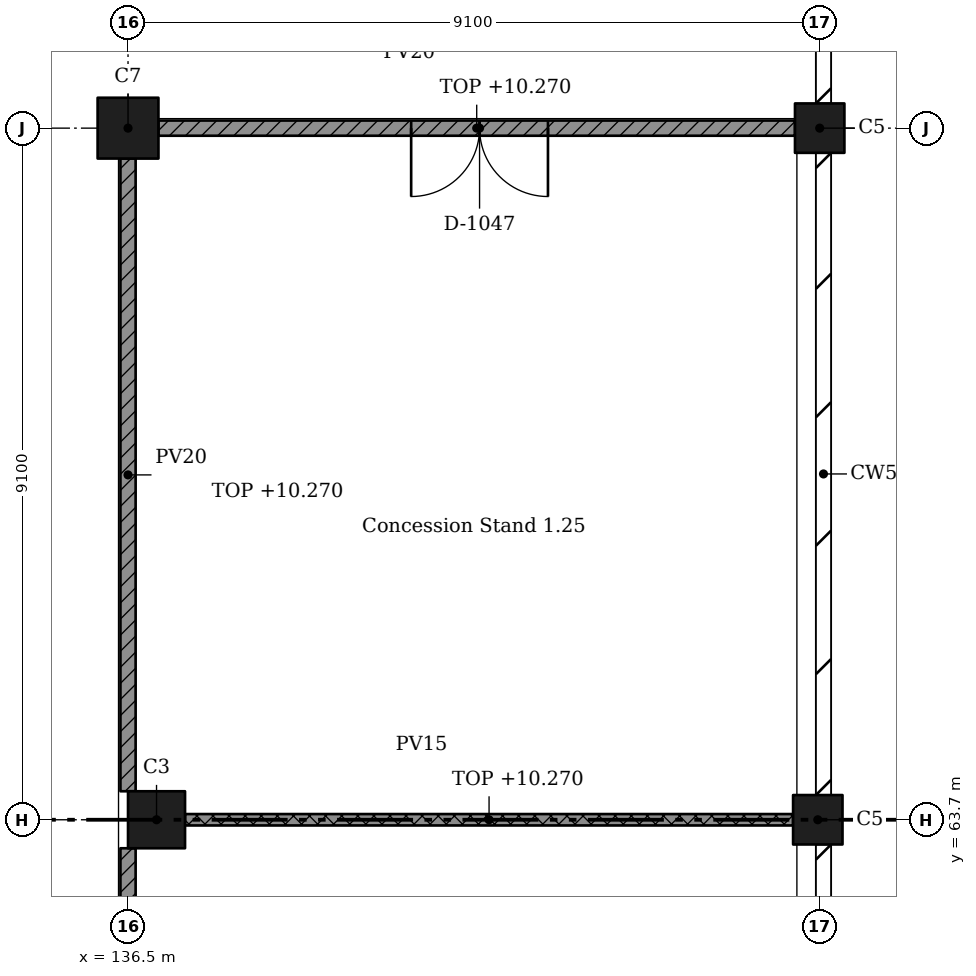
"""IFC4 building model, lengths in metres.
Left out: names, types, materials, properties, quantities, classifications, styles, units other than length and angle.
Written with IfcOpenShell. Run it as: python <this file> out.ifc"""

import sys

from ifc_helpers import new_model, si_unit, direction, frame, frame_2d, origin, origin_2d, place, context, subcontext, project, spatial, rectangle, extrude, element, fill, save


model = new_model("IFC4")
c1 = context("Model", 3, precision=1e-05, world=origin(), true_north=direction((0.0, 1.0)))
c2 = subcontext(c1, "Body", "Model", "MODEL_VIEW")
j1 = project(units=[si_unit("LENGTHUNIT", "METRE"), si_unit("PLANEANGLEUNIT", "RADIAN")], contexts=[c1])
p1 = place(None, origin())
s1 = spatial("IfcSite", under=j1, at=p1, CompositionType="ELEMENT")
p2 = place(p1, origin())
s2 = spatial("IfcBuilding", under=s1, at=p2, CompositionType="ELEMENT")
p3 = place(p2, frame((0.0, 0.0, 6.37)))
s3 = spatial("IfcBuildingStorey", under=s2, at=p3, CompositionType="ELEMENT", Elevation=6.37)
p4 = place(p3, frame((136.875, 63.7, 0.0), z_axis=(0.0, 0.0, 1.0), x_axis=(1.0, 0.0, 0.0)))
e1 = element("IfcColumn", 1, at=p4, inside=s3, PredefinedType="COLUMN", context=c2, shape_type="SweptSolid", body=[
    extrude(rectangle(XDim=0.75, YDim=0.75, at=origin_2d()), origin(), (0.0, 0.0, 1.0), 4.55),
])
p5 = place(p3, frame((136.5, 72.8, 0.0), z_axis=(0.0, 0.0, 1.0), x_axis=(1.0, 0.0, 0.0)))
e2 = element("IfcColumn", 2, at=p5, inside=s3, PredefinedType="COLUMN", context=c2, shape_type="SweptSolid", body=[
    extrude(rectangle(XDim=0.8, YDim=0.8, at=origin_2d()), origin(), (0.0, 0.0, 1.0), 4.55),
])
for number, where, z_axis, x_axis in (
    (3, (145.575, 63.7, 0.0), (0.0, 0.0, 1.0), (1.0, 0.0, 0.0)),
    (4, (145.6, 72.8, 0.0), (0.0, 0.0, 1.0), (1.0, 0.0, 0.0)),
):
    element("IfcColumn", number, at=place(p3, frame(where, z_axis=z_axis, x_axis=x_axis)), inside=s3, PredefinedType="COLUMN", context=c2, shape_type="SweptSolid", body=[
        extrude(rectangle(XDim=0.65, YDim=0.65, at=origin_2d()), origin(), (0.0, 0.0, 1.0), 4.55),
    ])
p6 = place(p3, frame((136.5, 63.325, 0.0), z_axis=(0.0, 0.0, 1.0), x_axis=(0.0, -1.0, 0.0)))
e5 = element("IfcWall", 5, at=p6, inside=s3, PredefinedType="PARTITIONING", context=c2, shape_type="SweptSolid", body=[
    extrude(rectangle(XDim=8.35, YDim=0.2, at=frame_2d((4.175, 0.0))), origin(), (0.0, 0.0, 1.0), 3.9),
])
p7 = place(p6, frame((3.65, 0.0, 0.0)))
e6 = element("IfcOpeningElement", 6, at=p7, cuts=e5, PredefinedType="OPENING", context=c2, shape_type="SweptSolid", body=[
    extrude(rectangle(XDim=1.0, YDim=2.1, at=frame_2d((0.5, 1.05))), frame((0.0, 0.11, 0.0), z_axis=(0.0, -1.0, 0.0), x_axis=(1.0, 0.0, 0.0)), (0.0, 0.0, 1.0), 0.22),
])
p8 = place(p3, frame((136.5, 72.4, 0.0), z_axis=(0.0, 0.0, 1.0), x_axis=(0.0, -1.0, 0.0)))
e7 = element("IfcWall", 7, at=p8, inside=s3, PredefinedType="PARTITIONING", context=c2, shape_type="SweptSolid", body=[
    extrude(rectangle(XDim=8.325, YDim=0.2, at=frame_2d((4.163, 0.0))), origin(), (0.0, 0.0, 1.0), 3.9),
])
p9 = place(p3, frame((137.25, 63.7, 0.0), z_axis=(0.0, 0.0, 1.0), x_axis=(1.0, 0.0, 0.0)))
e8 = element("IfcWall", 8, at=p9, inside=s3, PredefinedType="PARTITIONING", context=c2, shape_type="SweptSolid", body=[
    extrude(rectangle(XDim=8.0, YDim=0.15, at=frame_2d((4.0, 0.0))), origin(), (0.0, 0.0, 1.0), 3.9),
])
p10 = place(p3, frame((145.275, 72.8, 0.0), z_axis=(0.0, 0.0, 1.0), x_axis=(-1.0, 0.0, 0.0)))
e9 = element("IfcWall", 9, at=p10, inside=s3, PredefinedType="PARTITIONING", context=c2, shape_type="SweptSolid", body=[
    extrude(rectangle(XDim=8.375, YDim=0.2, at=frame_2d((4.188, 0.0))), origin(), (0.0, 0.0, 1.0), 3.9),
])
p11 = place(p10, frame((3.25, 0.0, 0.0)))
e10 = element("IfcOpeningElement", 10, at=p11, cuts=e9, PredefinedType="OPENING", context=c2, shape_type="SweptSolid", body=[
    extrude(rectangle(XDim=1.8, YDim=2.1, at=frame_2d((0.9, 1.05))), frame((0.0, 0.11, 0.0), z_axis=(0.0, -1.0, 0.0), x_axis=(1.0, 0.0, 0.0)), (0.0, 0.0, 1.0), 0.22),
])
p12 = place(p11, origin())
e11 = element("IfcDoor", 11, at=p12, inside=s3, OperationType="DOUBLE_DOOR_SINGLE_SWING", PredefinedType="DOOR", context=c2, shape_type="SweptSolid", body=[
    extrude(rectangle(XDim=1.8, YDim=2.1, at=frame_2d((0.9, 1.05))), frame((0.0, 0.025, 0.0), z_axis=(0.0, -1.0, 0.0), x_axis=(1.0, 0.0, 0.0)), (0.0, 0.0, 1.0), 0.05),
])
fill(e10, e11)
save(model, sys.argv[1])
